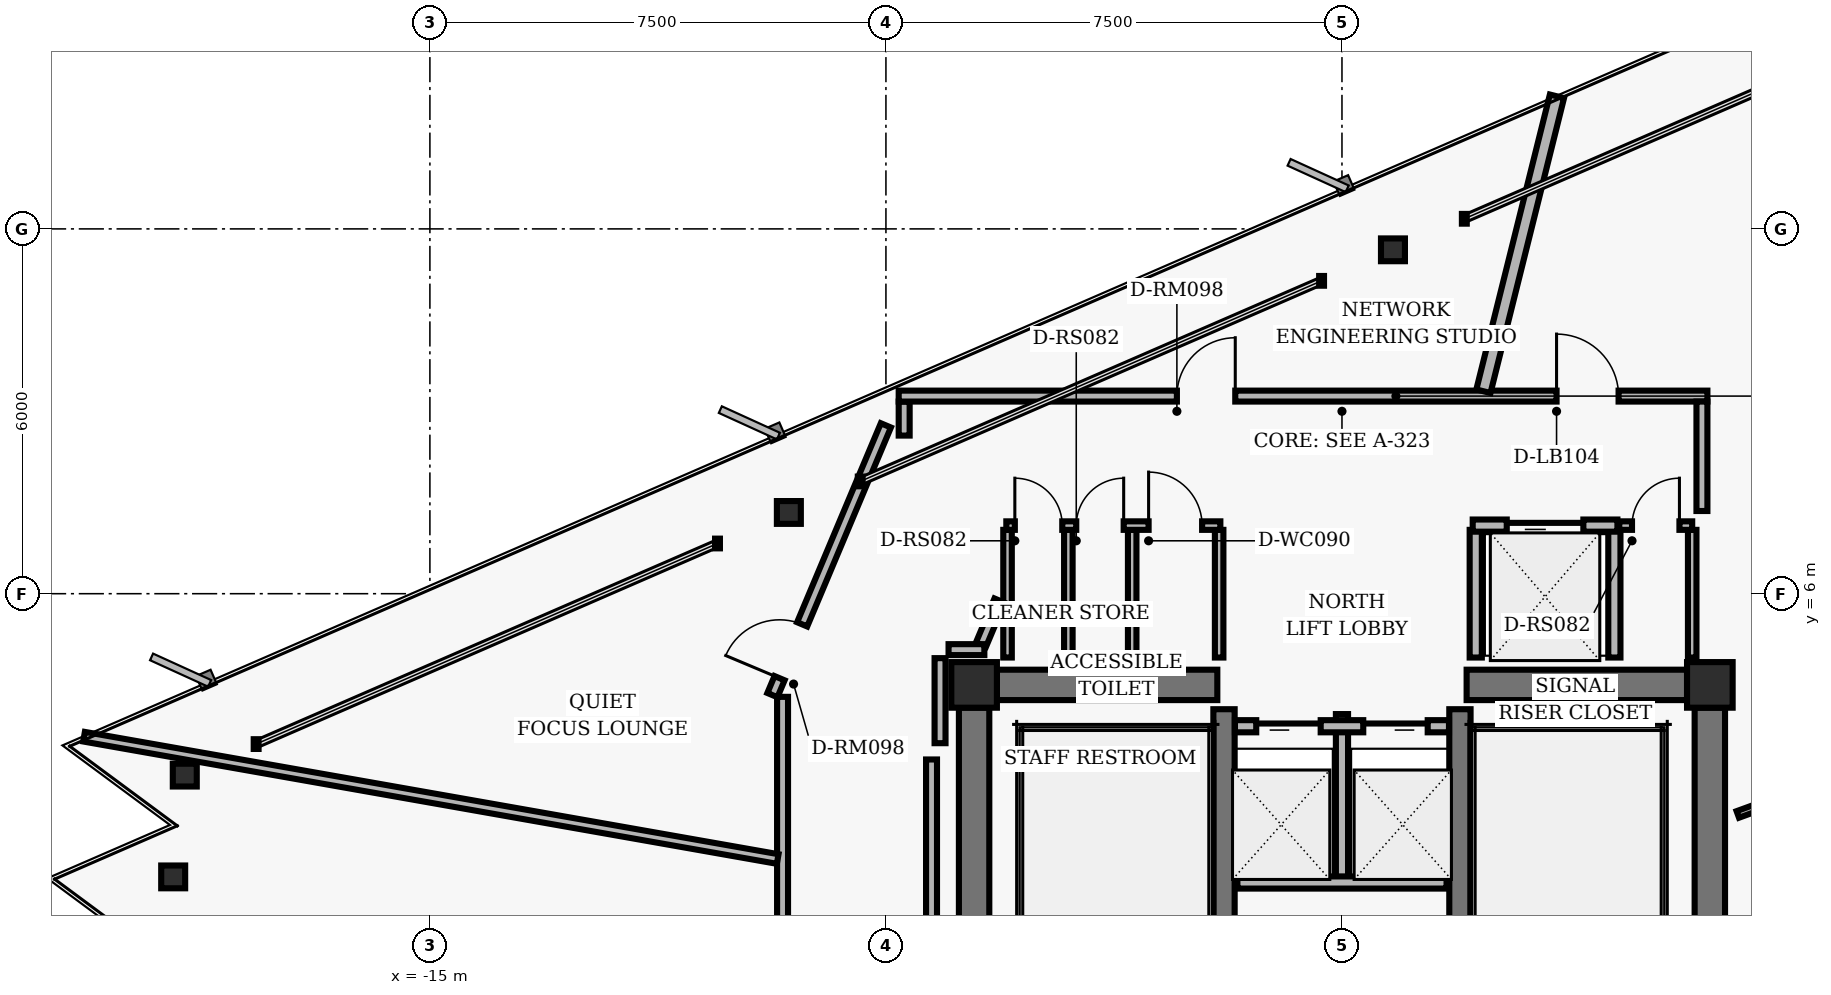
"""IFC4 building model, lengths in metres.
Left out: names, types, materials, properties, quantities, classifications, styles, units other than length and angle.
Written with IfcOpenShell. Run it as: python <this file> out.ifc"""

import sys

from ifc_helpers import new_model, si_unit, direction, frame, frame_2d, origin, origin_2d, place, context, subcontext, project, spatial, rectangle, hollow_rectangle, i_section, extrude, element, fill, save


model = new_model("IFC4")
c1 = context("Model", 3, precision=1e-05, world=origin(), true_north=direction((0.0, 1.0)))
c2 = subcontext(c1, "Body", "Model", "MODEL_VIEW")
j1 = project(units=[si_unit("LENGTHUNIT", "METRE"), si_unit("PLANEANGLEUNIT", "RADIAN")], contexts=[c1])
p1 = place(None, origin())
s1 = spatial("IfcSite", under=j1, at=p1, CompositionType="ELEMENT")
p2 = place(p1, origin())
s2 = spatial("IfcBuilding", under=s1, at=p2, CompositionType="ELEMENT")
p3 = place(p2, frame((0.0, 0.0, 220.96)))
s3 = spatial("IfcBuildingStorey", under=s2, at=p3, CompositionType="ELEMENT", Elevation=220.96)
for number, where, z_axis, x_axis in (
    (1, (-6.05, 4.5, 0.0), (0.0, 0.0, 1.0), (1.0, 0.0, 0.0)),
    (2, (6.05, 4.5, 0.0), (0.0, 0.0, 1.0), (1.0, 0.0, 0.0)),
):
    element("IfcColumn", number, at=place(p3, frame(where, z_axis=z_axis, x_axis=x_axis)), inside=s3, PredefinedType="COLUMN", context=c2, shape_type="SweptSolid", body=[
        extrude(hollow_rectangle(XDim=0.75, YDim=0.75, WallThickness=0.05, InnerFilletRadius=0.02, OuterFilletRadius=0.04, at=origin_2d()), origin(), (0.0, 0.0, 1.0), 3.04),
    ])
for number, where, z_axis, x_axis in (
    (3, (-6.05, 0.375, 0.0), (0.0, 0.0, 1.0), (0.0, 1.0, 0.0)),
    (4, (6.05, 0.375, 0.0), (0.0, 0.0, 1.0), (0.0, 1.0, 0.0)),
):
    element("IfcWall", number, at=place(p3, frame(where, z_axis=z_axis, x_axis=x_axis)), inside=s3, PredefinedType="SHEAR", context=c2, shape_type="SweptSolid", body=[
        extrude(rectangle(XDim=3.75, YDim=0.5, at=frame_2d((1.875, 0.0))), origin(), (0.0, 0.0, 1.0), 2.798),
    ])
for number, where, z_axis, x_axis in (
    (5, (-1.94, -4.1, 0.0), (0.0, 0.0, 1.0), (0.0, 1.0, 0.0)),
    (6, (1.94, -4.1, 0.0), (0.0, 0.0, 1.0), (0.0, 1.0, 0.0)),
):
    element("IfcWall", number, at=place(p3, frame(where, z_axis=z_axis, x_axis=x_axis)), inside=s3, PredefinedType="SHEAR", context=c2, shape_type="SweptSolid", body=[
        extrude(rectangle(XDim=8.2, YDim=0.35, at=frame_2d((4.1, 0.0))), origin(), (0.0, 0.0, 1.0), 2.798),
    ])
for number, where, z_axis, x_axis in (
    (7, (-5.675, 4.5, 0.0), (0.0, 0.0, 1.0), (1.0, 0.0, 0.0)),
    (8, (2.05, 4.5, 0.0), (0.0, 0.0, 1.0), (1.0, 0.0, 0.0)),
):
    element("IfcWall", number, at=place(p3, frame(where, z_axis=z_axis, x_axis=x_axis)), inside=s3, PredefinedType="SHEAR", context=c2, shape_type="SweptSolid", body=[
        extrude(rectangle(XDim=3.625, YDim=0.5, at=frame_2d((1.812, 0.0))), origin(), (0.0, 0.0, 1.0), 2.798),
    ])
for number, where, z_axis, x_axis in (
    (9, (0.838, 11.656, 0.0), (0.0, 0.0, 1.0), (1.0, 0.0, 0.0)),
    (10, (-9.096, 7.336, 0.0), (0.0, 0.0, 1.0), (1.0, 0.0, 0.0)),
    (11, (-19.031, 3.016, 0.0), (0.0, 0.0, 1.0), (1.0, 0.0, 0.0)),
    (12, (-19.222, 1.342, 0.0), (0.0, 0.0, 1.0), (1.0, 0.0, 0.0)),
):
    element("IfcColumn", number, at=place(p3, frame(where, z_axis=z_axis, x_axis=x_axis)), inside=s3, PredefinedType="COLUMN", context=c2, shape_type="SweptSolid", body=[
        extrude(i_section(OverallWidth=0.394, OverallDepth=0.375, WebThickness=0.017, FlangeThickness=0.028, FilletRadius=0.016, at=origin_2d()), origin(), (0.0, 0.0, 1.0), 3.04),
    ])
p4 = place(p3, frame((0.0, 1.25, 0.0), z_axis=(0.0, 0.0, 1.0), x_axis=(0.0, 1.0, 0.0)))
e13 = element("IfcWall", 13, at=p4, inside=s3, PredefinedType="PARTITIONING", context=c2, shape_type="SweptSolid", body=[
    extrude(rectangle(XDim=2.77, YDim=0.2, at=frame_2d((1.385, 0.0))), origin(), (0.0, 0.0, 1.0), 2.773),
])
p5 = place(p3, frame((-1.72, 1.25, 0.0), z_axis=(0.0, 0.0, 1.0), x_axis=(1.0, 0.0, 0.0)))
e14 = element("IfcWall", 14, at=p5, inside=s3, PredefinedType="PARTITIONING", context=c2, shape_type="SweptSolid", body=[
    extrude(rectangle(XDim=3.44, YDim=0.2, at=frame_2d((1.72, 0.0))), origin(), (0.0, 0.0, 1.0), 2.773),
])
p6 = place(p3, frame((-1.76, 3.82, 0.0), z_axis=(0.0, 0.0, 1.0), x_axis=(1.0, 0.0, 0.0)))
e15 = element("IfcWall", 15, at=p6, inside=s3, PredefinedType="PARTITIONING", context=c2, shape_type="SweptSolid", body=[
    extrude(rectangle(XDim=3.52, YDim=0.2, at=frame_2d((1.76, 0.0))), origin(), (0.0, 0.0, 1.0), 2.773),
])
p7 = place(p6, frame((0.35, 0.0, 0.0)))
e16 = element("IfcOpeningElement", 16, at=p7, cuts=e15, PredefinedType="OPENING", context=c2, shape_type="SweptSolid", body=[
    extrude(rectangle(XDim=1.06, YDim=2.04, at=frame_2d((0.53, 1.02))), frame((0.0, 0.11, 0.0), z_axis=(0.0, -1.0, 0.0), x_axis=(1.0, 0.0, 0.0)), (0.0, 0.0, 1.0), 0.22),
])
p8 = place(p6, frame((2.11, 0.0, 0.0)))
e17 = element("IfcOpeningElement", 17, at=p8, cuts=e15, PredefinedType="OPENING", context=c2, shape_type="SweptSolid", body=[
    extrude(rectangle(XDim=1.06, YDim=2.04, at=frame_2d((0.53, 1.02))), frame((0.0, 0.11, 0.0), z_axis=(0.0, -1.0, 0.0), x_axis=(1.0, 0.0, 0.0)), (0.0, 0.0, 1.0), 0.22),
])
for number, where, z_axis, x_axis in (
    (18, (2.2, 4.95, 0.0), (0.0, 0.0, 1.0), (0.0, 1.0, 0.0)),
    (19, (4.48, 4.95, 0.0), (0.0, 0.0, 1.0), (0.0, 1.0, 0.0)),
):
    element("IfcWall", number, at=place(p3, frame(where, z_axis=z_axis, x_axis=x_axis)), inside=s3, PredefinedType="PARTITIONING", context=c2, shape_type="SweptSolid", body=[
        extrude(rectangle(XDim=2.1, YDim=0.2, at=frame_2d((1.05, 0.0))), origin(), (0.0, 0.0, 1.0), 2.773),
    ])
p9 = place(p3, frame((2.15, 7.12, 0.0), z_axis=(0.0, 0.0, 1.0), x_axis=(1.0, 0.0, 0.0)))
e20 = element("IfcWall", 20, at=p9, inside=s3, PredefinedType="PARTITIONING", context=c2, shape_type="SweptSolid", body=[
    extrude(rectangle(XDim=2.38, YDim=0.2, at=frame_2d((1.19, 0.0))), origin(), (0.0, 0.0, 1.0), 2.395),
])
p10 = place(p9, frame((0.56, 0.0, 0.0)))
e21 = element("IfcOpeningElement", 21, at=p10, cuts=e20, PredefinedType="OPENING", context=c2, shape_type="SweptSolid", body=[
    extrude(rectangle(XDim=1.26, YDim=2.06, at=frame_2d((0.63, 1.03))), frame((0.0, 0.11, 0.0), z_axis=(0.0, -1.0, 0.0), x_axis=(1.0, 0.0, 0.0)), (0.0, 0.0, 1.0), 0.22),
])
for number, where, z_axis, x_axis in (
    (22, (-5.5, 4.95, 0.0), (0.0, 0.0, 1.0), (0.0, 1.0, 0.0)),
    (23, (-4.5, 4.95, 0.0), (0.0, 0.0, 1.0), (0.0, 1.0, 0.0)),
    (24, (-3.45, 4.95, 0.0), (0.0, 0.0, 1.0), (0.0, 1.0, 0.0)),
    (25, (-2.02, 4.95, 0.0), (0.0, 0.0, 1.0), (0.0, 1.0, 0.0)),
):
    element("IfcWall", number, at=place(p3, frame(where, z_axis=z_axis, x_axis=x_axis)), inside=s3, PredefinedType="PARTITIONING", context=c2, shape_type="SweptSolid", body=[
        extrude(rectangle(XDim=2.1, YDim=0.14, at=frame_2d((1.05, 0.0))), origin(), (0.0, 0.0, 1.0), 2.773),
    ])
p11 = place(p3, frame((-5.52, 7.12, 0.0), z_axis=(0.0, 0.0, 1.0), x_axis=(1.0, 0.0, 0.0)))
e26 = element("IfcWall", 26, at=p11, inside=s3, PredefinedType="PARTITIONING", context=c2, shape_type="SweptSolid", body=[
    extrude(rectangle(XDim=3.52, YDim=0.14, at=frame_2d((1.76, 0.0))), origin(), (0.0, 0.0, 1.0), 2.395),
])
p12 = place(p11, frame((0.14, 0.0, 0.0)))
e27 = element("IfcOpeningElement", 27, at=p12, cuts=e26, PredefinedType="OPENING", context=c2, shape_type="SweptSolid", body=[
    extrude(rectangle(XDim=0.78, YDim=2.01, at=frame_2d((0.39, 1.005))), frame((0.0, 0.08, 0.0), z_axis=(0.0, -1.0, 0.0), x_axis=(1.0, 0.0, 0.0)), (0.0, 0.0, 1.0), 0.16),
])
p13 = place(p11, frame((1.15, 0.0, 0.0)))
e28 = element("IfcOpeningElement", 28, at=p13, cuts=e26, PredefinedType="OPENING", context=c2, shape_type="SweptSolid", body=[
    extrude(rectangle(XDim=0.78, YDim=2.01, at=frame_2d((0.39, 1.005))), frame((0.0, 0.08, 0.0), z_axis=(0.0, -1.0, 0.0), x_axis=(1.0, 0.0, 0.0)), (0.0, 0.0, 1.0), 0.16),
])
p14 = place(p11, frame((2.34, 0.0, 0.0)))
e29 = element("IfcOpeningElement", 29, at=p14, cuts=e26, PredefinedType="OPENING", context=c2, shape_type="SweptSolid", body=[
    extrude(rectangle(XDim=0.88, YDim=2.02, at=frame_2d((0.44, 1.01))), frame((0.0, 0.08, 0.0), z_axis=(0.0, -1.0, 0.0), x_axis=(1.0, 0.0, 0.0)), (0.0, 0.0, 1.0), 0.16),
])
p15 = place(p3, frame((5.76, 4.95, 0.0), z_axis=(0.0, 0.0, 1.0), x_axis=(0.0, 1.0, 0.0)))
e30 = element("IfcWall", 30, at=p15, inside=s3, PredefinedType="PARTITIONING", context=c2, shape_type="SweptSolid", body=[
    extrude(rectangle(XDim=2.1, YDim=0.14, at=frame_2d((1.05, 0.0))), origin(), (0.0, 0.0, 1.0), 2.773),
])
p16 = place(p3, frame((4.56, 7.12, 0.0), z_axis=(0.0, 0.0, 1.0), x_axis=(1.0, 0.0, 0.0)))
e31 = element("IfcWall", 31, at=p16, inside=s3, PredefinedType="PARTITIONING", context=c2, shape_type="SweptSolid", body=[
    extrude(rectangle(XDim=1.2, YDim=0.14, at=frame_2d((0.6, 0.0))), origin(), (0.0, 0.0, 1.0), 2.773),
])
p17 = place(p16, frame((0.21, 0.0, 0.0)))
e32 = element("IfcOpeningElement", 32, at=p17, cuts=e31, PredefinedType="OPENING", context=c2, shape_type="SweptSolid", body=[
    extrude(rectangle(XDim=0.78, YDim=2.01, at=frame_2d((0.39, 1.005))), frame((0.0, 0.08, 0.0), z_axis=(0.0, -1.0, 0.0), x_axis=(1.0, 0.0, 0.0)), (0.0, 0.0, 1.0), 0.16),
])
p18 = place(p3, frame((-9.2, -4.303, 0.0), z_axis=(0.0, 0.0, 1.0), x_axis=(0.0, 1.0, 0.0)))
e33 = element("IfcWall", 33, at=p18, inside=s3, PredefinedType="PARTITIONING", context=c2, shape_type="SweptSolid", body=[
    extrude(rectangle(XDim=8.607, YDim=0.18, at=frame_2d((4.303, 0.0))), origin(), (0.0, 0.0, 1.0), 2.773),
])
p19 = place(p18, frame((2.767, 0.0, 0.0)))
e34 = element("IfcOpeningElement", 34, at=p19, cuts=e33, PredefinedType="OPENING", context=c2, shape_type="SweptSolid", body=[
    extrude(rectangle(XDim=0.96, YDim=2.02, at=frame_2d((0.48, 1.01))), frame((0.0, 0.1, 0.0), z_axis=(0.0, -1.0, 0.0), x_axis=(1.0, 0.0, 0.0)), (0.0, 0.0, 1.0), 0.2),
])
p20 = place(p3, frame((-9.367, 4.332, 0.0), z_axis=(0.0, 0.0, 1.0), x_axis=(0.387573945081, 0.921838617706, 0.0)))
e35 = element("IfcWall", 35, at=p20, inside=s3, PredefinedType="PARTITIONING", context=c2, shape_type="SweptSolid", body=[
    extrude(rectangle(XDim=4.813, YDim=0.18, at=frame_2d((2.407, 0.0))), origin(), (0.0, 0.0, 1.0), 2.773),
])
p21 = place(p20, frame((0.302, 0.0, 0.0)))
e36 = element("IfcOpeningElement", 36, at=p21, cuts=e35, PredefinedType="OPENING", context=c2, shape_type="SweptSolid", body=[
    extrude(rectangle(XDim=0.96, YDim=2.02, at=frame_2d((0.48, 1.01))), frame((0.0, 0.1, 0.0), z_axis=(0.0, -1.0, 0.0), x_axis=(1.0, 0.0, 0.0)), (0.0, 0.0, 1.0), 0.2),
])
p22 = place(p3, frame((-7.2, 8.601, 0.0), z_axis=(0.0, 0.0, 1.0), x_axis=(0.0, 1.0, 0.0)))
e37 = element("IfcWall", 37, at=p22, inside=s3, PredefinedType="PARTITIONING", context=c2, shape_type="SweptSolid", body=[
    extrude(rectangle(XDim=0.559, YDim=0.18, at=frame_2d((0.28, 0.0))), origin(), (0.0, 0.0, 1.0), 2.773),
])
p23 = place(p3, frame((-7.29, 9.25, 0.0), z_axis=(0.0, 0.0, 1.0), x_axis=(1.0, 0.0, 0.0)))
e38 = element("IfcWall", 38, at=p23, inside=s3, PredefinedType="PARTITIONING", context=c2, shape_type="SweptSolid", body=[
    extrude(rectangle(XDim=13.3, YDim=0.18, at=frame_2d((6.65, 0.0))), origin(), (0.0, 0.0, 1.0), 2.395),
])
p24 = place(p23, frame((10.819, 0.0, 0.0)))
e39 = element("IfcOpeningElement", 39, at=p24, cuts=e38, PredefinedType="OPENING", context=c2, shape_type="SweptSolid", body=[
    extrude(rectangle(XDim=1.02, YDim=2.02, at=frame_2d((0.51, 1.01))), frame((0.0, 0.1, 0.0), z_axis=(0.0, -1.0, 0.0), x_axis=(1.0, 0.0, 0.0)), (0.0, 0.0, 1.0), 0.2),
])
p25 = place(p23, frame((4.575, 0.0, 0.0)))
e40 = element("IfcOpeningElement", 40, at=p25, cuts=e38, PredefinedType="OPENING", context=c2, shape_type="SweptSolid", body=[
    extrude(rectangle(XDim=0.96, YDim=2.02, at=frame_2d((0.48, 1.01))), frame((0.0, 0.1, 0.0), z_axis=(0.0, -1.0, 0.0), x_axis=(1.0, 0.0, 0.0)), (0.0, 0.0, 1.0), 0.2),
])
p26 = place(p3, frame((5.92, 9.16, 0.0), z_axis=(0.0, 0.0, 1.0), x_axis=(0.0, -1.0, 0.0)))
e41 = element("IfcWall", 41, at=p26, inside=s3, PredefinedType="PARTITIONING", context=c2, shape_type="SweptSolid", body=[
    extrude(rectangle(XDim=1.8, YDim=0.18, at=frame_2d((0.9, 0.0))), origin(), (0.0, 0.0, 1.0), 2.773),
])
p27 = place(p3, frame((-5.632, 5.887, 0.0), z_axis=(0.0, 0.0, 1.0), x_axis=(-0.387792833522, -0.921746558588, 0.0)))
e42 = element("IfcWall", 42, at=p27, inside=s3, PredefinedType="PARTITIONING", context=c2, shape_type="SweptSolid", body=[
    extrude(rectangle(XDim=0.785, YDim=0.18, at=frame_2d((0.393, 0.0))), origin(), (0.0, 0.0, 1.0), 2.773),
])
p28 = place(p3, frame((-5.881, 5.08, 0.0), z_axis=(0.0, 0.0, 1.0), x_axis=(-1.0, 0.0, 0.0)))
e43 = element("IfcWall", 43, at=p28, inside=s3, PredefinedType="PARTITIONING", context=c2, shape_type="SweptSolid", body=[
    extrude(rectangle(XDim=0.589, YDim=0.18, at=frame_2d((0.294, 0.0))), origin(), (0.0, 0.0, 1.0), 2.773),
])
p29 = place(p3, frame((-6.61, 4.94, 0.0), z_axis=(0.0, 0.0, 1.0), x_axis=(0.0, -1.0, 0.0)))
e44 = element("IfcWall", 44, at=p29, inside=s3, PredefinedType="PARTITIONING", context=c2, shape_type="SweptSolid", body=[
    extrude(rectangle(XDim=1.399, YDim=0.18, at=frame_2d((0.699, 0.0))), origin(), (0.0, 0.0, 1.0), 2.773),
])
p30 = place(p3, frame((-6.75, 3.273, 0.0), z_axis=(0.0, 0.0, 1.0), x_axis=(0.0, -1.0, 0.0)))
e45 = element("IfcWall", 45, at=p30, inside=s3, PredefinedType="PARTITIONING", context=c2, shape_type="SweptSolid", body=[
    extrude(rectangle(XDim=6.547, YDim=0.18, at=frame_2d((3.273, 0.0))), origin(), (0.0, 0.0, 1.0), 2.773),
])
p31 = place(p3, frame((6.51, 2.369, 0.0), z_axis=(0.0, 0.0, 1.0), x_axis=(0.939690503952, 0.342025959222, 0.0)))
e46 = element("IfcWall", 46, at=p31, inside=s3, PredefinedType="MOVABLE", context=c2, shape_type="SweptSolid", body=[
    extrude(rectangle(XDim=6.028, YDim=0.115, at=frame_2d((3.014, 0.0))), origin(), (0.0, 0.0, 1.0), 2.773),
])
p32 = place(p3, frame((2.326, 9.33, 0.0), z_axis=(0.0, 0.0, 1.0), x_axis=(0.24192658113, 0.97029455803, 0.0)))
e47 = element("IfcWall", 47, at=p32, inside=s3, PredefinedType="PARTITIONING", context=c2, shape_type="SweptSolid", body=[
    extrude(rectangle(XDim=4.999, YDim=0.24, at=frame_2d((2.5, 0.0))), origin(), (0.0, 0.0, 1.0), 2.773),
])
p33 = place(p3, frame((-9.28, 1.636, 0.0), z_axis=(0.0, 0.0, 1.0), x_axis=(-0.984805616272, 0.173660295285, 0.0)))
e48 = element("IfcWall", 48, at=p33, inside=s3, PredefinedType="PARTITIONING", context=c2, shape_type="SweptSolid", body=[
    extrude(rectangle(XDim=11.584, YDim=0.16, at=frame_2d((5.792, 0.0))), origin(), (0.0, 0.0, 1.0), 2.253),
])
p34 = place(p7, origin())
e49 = element("IfcDoor", 49, at=p34, inside=s3, OperationType="SLIDING_TO_LEFT", PredefinedType="DOOR", context=c2, shape_type="SweptSolid", body=[
    extrude(rectangle(XDim=1.06, YDim=2.04, at=frame_2d((0.53, 1.02))), frame((0.0, 0.025, 0.0), z_axis=(0.0, -1.0, 0.0), x_axis=(1.0, 0.0, 0.0)), (0.0, 0.0, 1.0), 0.05),
])
fill(e16, e49)
p35 = place(p8, origin())
e50 = element("IfcDoor", 50, at=p35, inside=s3, OperationType="SLIDING_TO_RIGHT", PredefinedType="DOOR", context=c2, shape_type="SweptSolid", body=[
    extrude(rectangle(XDim=1.06, YDim=2.04, at=frame_2d((0.53, 1.02))), frame((0.0, 0.025, 0.0), z_axis=(0.0, -1.0, 0.0), x_axis=(1.0, 0.0, 0.0)), (0.0, 0.0, 1.0), 0.05),
])
fill(e17, e50)
p36 = place(p10, origin())
e51 = element("IfcDoor", 51, at=p36, inside=s3, OperationType="SLIDING_TO_LEFT", PredefinedType="DOOR", context=c2, shape_type="SweptSolid", body=[
    extrude(rectangle(XDim=1.26, YDim=2.06, at=frame_2d((0.63, 1.03))), frame((0.0, 0.025, 0.0), z_axis=(0.0, -1.0, 0.0), x_axis=(1.0, 0.0, 0.0)), (0.0, 0.0, 1.0), 0.05),
])
fill(e21, e51)
p37 = place(p12, origin())
e52 = element("IfcDoor", 52, at=p37, inside=s3, OperationType="SINGLE_SWING_LEFT", PredefinedType="DOOR", context=c2, shape_type="SweptSolid", body=[
    extrude(rectangle(XDim=0.78, YDim=2.01, at=frame_2d((0.39, 1.005))), frame((0.0, 0.025, 0.0), z_axis=(0.0, -1.0, 0.0), x_axis=(1.0, 0.0, 0.0)), (0.0, 0.0, 1.0), 0.05),
])
fill(e27, e52)
p38 = place(p13, origin())
e53 = element("IfcDoor", 53, at=p38, inside=s3, OperationType="SINGLE_SWING_RIGHT", PredefinedType="DOOR", context=c2, shape_type="SweptSolid", body=[
    extrude(rectangle(XDim=0.78, YDim=2.01, at=frame_2d((0.39, 1.005))), frame((0.0, 0.025, 0.0), z_axis=(0.0, -1.0, 0.0), x_axis=(1.0, 0.0, 0.0)), (0.0, 0.0, 1.0), 0.05),
])
fill(e28, e53)
p39 = place(p14, origin())
e54 = element("IfcDoor", 54, at=p39, inside=s3, OperationType="SINGLE_SWING_LEFT", PredefinedType="DOOR", context=c2, shape_type="SweptSolid", body=[
    extrude(rectangle(XDim=0.88, YDim=2.02, at=frame_2d((0.44, 1.01))), frame((0.0, 0.025, 0.0), z_axis=(0.0, -1.0, 0.0), x_axis=(1.0, 0.0, 0.0)), (0.0, 0.0, 1.0), 0.05),
])
fill(e29, e54)
p40 = place(p17, origin())
e55 = element("IfcDoor", 55, at=p40, inside=s3, OperationType="SINGLE_SWING_RIGHT", PredefinedType="DOOR", context=c2, shape_type="SweptSolid", body=[
    extrude(rectangle(XDim=0.78, YDim=2.01, at=frame_2d((0.39, 1.005))), frame((0.0, 0.025, 0.0), z_axis=(0.0, -1.0, 0.0), x_axis=(1.0, 0.0, 0.0)), (0.0, 0.0, 1.0), 0.05),
])
fill(e32, e55)
p41 = place(p24, origin())
e56 = element("IfcDoor", 56, at=p41, inside=s3, OperationType="SINGLE_SWING_LEFT", PredefinedType="DOOR", context=c2, shape_type="SweptSolid", body=[
    extrude(rectangle(XDim=1.02, YDim=2.02, at=frame_2d((0.51, 1.01))), frame((0.0, 0.025, 0.0), z_axis=(0.0, -1.0, 0.0), x_axis=(1.0, 0.0, 0.0)), (0.0, 0.0, 1.0), 0.05),
])
fill(e39, e56)
p42 = place(p25, origin())
e57 = element("IfcDoor", 57, at=p42, inside=s3, OperationType="SINGLE_SWING_RIGHT", PredefinedType="DOOR", context=c2, shape_type="SweptSolid", body=[
    extrude(rectangle(XDim=0.96, YDim=2.02, at=frame_2d((0.48, 1.01))), frame((0.0, 0.025, 0.0), z_axis=(0.0, -1.0, 0.0), x_axis=(1.0, 0.0, 0.0)), (0.0, 0.0, 1.0), 0.05),
])
fill(e40, e57)
p43 = place(p21, origin())
e58 = element("IfcDoor", 58, at=p43, inside=s3, OperationType="SINGLE_SWING_LEFT", PredefinedType="DOOR", context=c2, shape_type="SweptSolid", body=[
    extrude(rectangle(XDim=0.96, YDim=2.02, at=frame_2d((0.48, 1.01))), frame((0.0, 0.025, 0.0), z_axis=(0.0, -1.0, 0.0), x_axis=(1.0, 0.0, 0.0)), (0.0, 0.0, 1.0), 0.05),
])
fill(e36, e58)
save(model, sys.argv[1])
